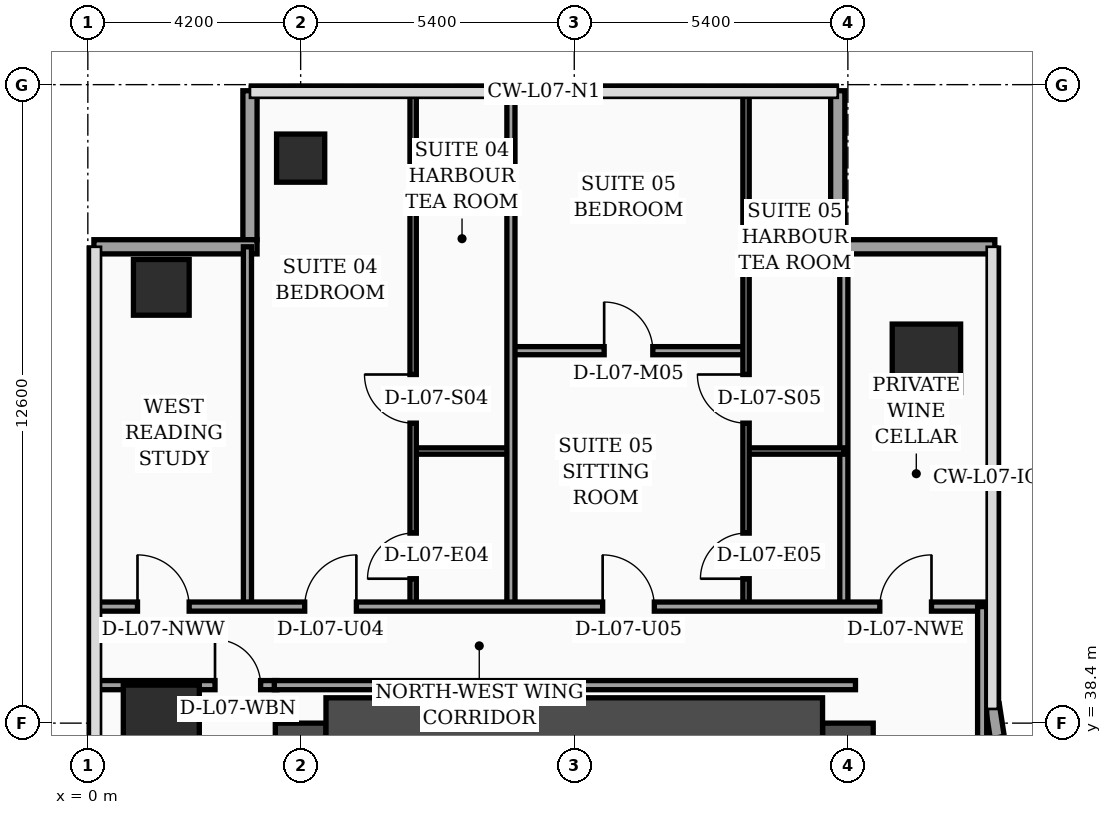
"""IFC4 building model, lengths in metres.
Left out: names, types, materials, properties, quantities, classifications, styles, units other than length and angle.
Written with IfcOpenShell. Run it as: python <this file> out.ifc"""

import sys

from ifc_helpers import new_model, si_unit, direction, frame, frame_2d, origin, origin_2d, place, context, subcontext, project, spatial, rectangle, hollow_rectangle, extrude, element, fill, save


model = new_model("IFC4")
c1 = context("Model", 3, precision=1e-05, world=origin(), true_north=direction((0.0, 1.0)))
c2 = subcontext(c1, "Body", "Model", "MODEL_VIEW")
j1 = project(units=[si_unit("LENGTHUNIT", "METRE"), si_unit("PLANEANGLEUNIT", "RADIAN")], contexts=[c1])
p1 = place(None, origin())
s1 = spatial("IfcSite", under=j1, at=p1, CompositionType="ELEMENT")
p2 = place(p1, origin())
s2 = spatial("IfcBuilding", under=s1, at=p2, CompositionType="ELEMENT")
p3 = place(p2, frame((0.0, 0.0, 34.6)))
s3 = spatial("IfcBuildingStorey", under=s2, at=p3, CompositionType="ELEMENT", Elevation=34.6)
p4 = place(p3, frame((4.2, 16.8, 0.0), z_axis=(0.0, 0.0, 1.0), x_axis=(0.0, 1.0, 0.0)))
e1 = element("IfcWall", 1, at=p4, inside=s3, PredefinedType="SHEAR", context=c2, shape_type="SweptSolid", body=[
    extrude(rectangle(XDim=21.6, YDim=1.0, at=frame_2d((10.8, 0.0))), origin(), (0.0, 0.0, 1.0), 3.56),
])
p5 = place(p3, frame((15.0, 16.8, 0.0), z_axis=(0.0, 0.0, 1.0), x_axis=(0.0, 1.0, 0.0)))
e2 = element("IfcWall", 2, at=p5, inside=s3, PredefinedType="SHEAR", context=c2, shape_type="SweptSolid", body=[
    extrude(rectangle(XDim=21.6, YDim=1.0, at=frame_2d((10.8, 0.0))), origin(), (0.0, 0.0, 1.0), 3.56),
])
p6 = place(p5, frame((8.65, 0.0, 0.0)))
e3 = element("IfcOpeningElement", 3, at=p6, cuts=e2, PredefinedType="OPENING", context=c2, shape_type="SweptSolid", body=[
    extrude(rectangle(XDim=1.1, YDim=2.2, at=frame_2d((0.55, 1.1))), frame((0.0, 0.51, 0.0), z_axis=(0.0, -1.0, 0.0), x_axis=(1.0, 0.0, 0.0)), (0.0, 0.0, 1.0), 1.02),
])
p7 = place(p5, frame((1.25, 0.0, 0.0)))
e4 = element("IfcOpeningElement", 4, at=p7, cuts=e2, PredefinedType="OPENING", context=c2, shape_type="SweptSolid", body=[
    extrude(rectangle(XDim=1.1, YDim=2.2, at=frame_2d((0.55, 1.1))), frame((0.0, 0.51, 0.0), z_axis=(0.0, -1.0, 0.0), x_axis=(1.0, 0.0, 0.0)), (0.0, 0.0, 1.0), 1.02),
])
p8 = place(p5, frame((3.8, 0.0, 0.0)))
e5 = element("IfcOpeningElement", 5, at=p8, cuts=e2, PredefinedType="OPENING", context=c2, shape_type="SweptSolid", body=[
    extrude(rectangle(XDim=1.1, YDim=2.2, at=frame_2d((0.55, 1.1))), frame((0.0, 0.51, 0.0), z_axis=(0.0, -1.0, 0.0), x_axis=(1.0, 0.0, 0.0)), (0.0, 0.0, 1.0), 1.02),
])
p9 = place(p5, frame((6.35, 0.0, 0.0)))
e6 = element("IfcOpeningElement", 6, at=p9, cuts=e2, PredefinedType="OPENING", context=c2, shape_type="SweptSolid", body=[
    extrude(rectangle(XDim=1.1, YDim=2.2, at=frame_2d((0.55, 1.1))), frame((0.0, 0.51, 0.0), z_axis=(0.0, -1.0, 0.0), x_axis=(1.0, 0.0, 0.0)), (0.0, 0.0, 1.0), 1.02),
])
p10 = place(p3, frame((4.7, 38.4, 0.0), z_axis=(0.0, 0.0, 1.0), x_axis=(1.0, 0.0, 0.0)))
e7 = element("IfcWall", 7, at=p10, inside=s3, PredefinedType="SHEAR", context=c2, shape_type="SweptSolid", body=[
    extrude(rectangle(XDim=9.8, YDim=1.0, at=frame_2d((4.9, 0.0))), origin(), (0.0, 0.0, 1.0), 3.56),
])
p11 = place(p3, frame((1.45, 38.4, 0.0), z_axis=(0.0, 0.0, 1.0), x_axis=(1.0, 0.0, 0.0)))
e8 = element("IfcColumn", 8, at=p11, inside=s3, PredefinedType="COLUMN", context=c2, shape_type="SweptSolid", body=[
    extrude(rectangle(XDim=1.5, YDim=1.5, at=origin_2d()), origin(), (0.0, 0.0, 1.0), 3.56),
])
p12 = place(p3, frame((1.45, 47.0, 0.0), z_axis=(0.0, 0.0, 1.0), x_axis=(1.0, 0.0, 0.0)))
e9 = element("IfcColumn", 9, at=p12, inside=s3, PredefinedType="COLUMN", context=c2, shape_type="SweptSolid", body=[
    extrude(hollow_rectangle(XDim=1.1, YDim=1.1, WallThickness=0.045, at=origin_2d()), origin(), (0.0, 0.0, 1.0), 3.56),
])
p13 = place(p3, frame((4.2, 49.55, 0.0), z_axis=(0.0, 0.0, 1.0), x_axis=(1.0, 0.0, 0.0)))
e10 = element("IfcColumn", 10, at=p13, inside=s3, PredefinedType="COLUMN", context=c2, shape_type="SweptSolid", body=[
    extrude(hollow_rectangle(XDim=0.95, YDim=0.95, WallThickness=0.04, at=origin_2d()), origin(), (0.0, 0.0, 1.0), 3.56),
])
p14 = place(p3, frame((16.55, 45.6, 0.0), z_axis=(0.0, 0.0, 1.0), x_axis=(1.0, 0.0, 0.0)))
e11 = element("IfcColumn", 11, at=p14, inside=s3, PredefinedType="COLUMN", context=c2, shape_type="SweptSolid", body=[
    extrude(rectangle(XDim=1.35, YDim=1.35, at=origin_2d()), origin(), (0.0, 0.0, 1.0), 3.56),
])
p15 = place(p3, frame((17.962, 38.03, 0.0), z_axis=(0.0, 0.0, 1.0), x_axis=(-0.15141125477, 0.988470855377, 0.0)))
e12 = element("IfcWall", 12, at=p15, inside=s3, PredefinedType="SOLIDWALL", context=c2, shape_type="SweptSolid", body=[
    extrude(rectangle(XDim=0.739, YDim=0.28, at=frame_2d((0.369, 0.0))), origin(), (0.0, 0.0, 1.0), 3.56),
])
p16 = place(p3, frame((17.9, 47.8, 0.0), z_axis=(0.0, 0.0, 1.0), x_axis=(-1.0, 0.0, 0.0)))
e13 = element("IfcWall", 13, at=p16, inside=s3, PredefinedType="SOLIDWALL", context=c2, shape_type="SweptSolid", body=[
    extrude(rectangle(XDim=3.24, YDim=0.28, at=frame_2d((1.62, 0.0))), origin(), (0.0, 0.0, 1.0), 3.56),
])
p17 = place(p3, frame((14.8, 47.94, 0.0), z_axis=(0.0, 0.0, 1.0), x_axis=(0.0, 1.0, 0.0)))
e14 = element("IfcWall", 14, at=p17, inside=s3, PredefinedType="SOLIDWALL", context=c2, shape_type="SweptSolid", body=[
    extrude(rectangle(XDim=2.94, YDim=0.28, at=frame_2d((1.47, 0.0))), origin(), (0.0, 0.0, 1.0), 3.56),
])
p18 = place(p3, frame((3.2, 50.88, 0.0), z_axis=(0.0, 0.0, 1.0), x_axis=(0.0, -1.0, 0.0)))
e15 = element("IfcWall", 15, at=p18, inside=s3, PredefinedType="SOLIDWALL", context=c2, shape_type="SweptSolid", body=[
    extrude(rectangle(XDim=2.94, YDim=0.28, at=frame_2d((1.47, 0.0))), origin(), (0.0, 0.0, 1.0), 3.04),
])
p19 = place(p3, frame((3.34, 47.8, 0.0), z_axis=(0.0, 0.0, 1.0), x_axis=(-1.0, 0.0, 0.0)))
e16 = element("IfcWall", 16, at=p19, inside=s3, PredefinedType="SOLIDWALL", context=c2, shape_type="SweptSolid", body=[
    extrude(rectangle(XDim=3.22, YDim=0.28, at=frame_2d((1.61, 0.0))), origin(), (0.0, 0.0, 1.0), 3.04),
])
p20 = place(p3, frame((0.08, 39.15, 0.0), z_axis=(0.0, 0.0, 1.0), x_axis=(1.0, 0.0, 0.0)))
e17 = element("IfcWall", 17, at=p20, inside=s3, PredefinedType="PARTITIONING", context=c2, shape_type="SweptSolid", body=[
    extrude(rectangle(XDim=3.65, YDim=0.18, at=frame_2d((1.825, 0.0))), origin(), (0.0, 0.0, 1.0), 2.84),
])
p21 = place(p20, frame((2.43, 0.0, 0.0)))
e18 = element("IfcOpeningElement", 18, at=p21, cuts=e17, PredefinedType="OPENING", context=c2, shape_type="SweptSolid", body=[
    extrude(rectangle(XDim=0.9, YDim=2.15, at=frame_2d((0.45, 1.075))), frame((0.0, 0.1, 0.0), z_axis=(0.0, -1.0, 0.0), x_axis=(1.0, 0.0, 0.0)), (0.0, 0.0, 1.0), 0.2),
])
p22 = place(p3, frame((3.15, 40.7, 0.0), z_axis=(0.0, 0.0, 1.0), x_axis=(0.0, 1.0, 0.0)))
e19 = element("IfcWall", 19, at=p22, inside=s3, PredefinedType="PARTITIONING", context=c2, shape_type="SweptSolid", body=[
    extrude(rectangle(XDim=7.1, YDim=0.16, at=frame_2d((3.55, 0.0))), origin(), (0.0, 0.0, 1.0), 3.14),
])
p23 = place(p3, frame((14.92, 40.7, 0.0), z_axis=(0.0, 0.0, 1.0), x_axis=(0.0, 1.0, 0.0)))
e20 = element("IfcWall", 20, at=p23, inside=s3, PredefinedType="PARTITIONING", context=c2, shape_type="SweptSolid", body=[
    extrude(rectangle(XDim=7.1, YDim=0.16, at=frame_2d((3.55, 0.0))), origin(), (0.0, 0.0, 1.0), 3.04),
])
p24 = place(p3, frame((6.42, 43.77, 0.0), z_axis=(0.0, 0.0, 1.0), x_axis=(1.0, 0.0, 0.0)))
e21 = element("IfcWall", 21, at=p24, inside=s3, PredefinedType="PARTITIONING", context=c2, shape_type="SweptSolid", body=[
    extrude(rectangle(XDim=1.93, YDim=0.125, at=frame_2d((0.965, 0.0))), origin(), (0.0, 0.0, 1.0), 3.56),
])
p25 = place(p3, frame((6.42, 40.7, 0.0), z_axis=(0.0, 0.0, 1.0), x_axis=(0.0, 1.0, 0.0)))
e22 = element("IfcWall", 22, at=p25, inside=s3, PredefinedType="PARTITIONING", context=c2, shape_type="SweptSolid", body=[
    extrude(rectangle(XDim=10.24, YDim=0.125, at=frame_2d((5.12, 0.0))), origin(), (0.0, 0.0, 1.0), 3.04),
])
p26 = place(p25, frame((0.55, 0.0, 0.0)))
e23 = element("IfcOpeningElement", 23, at=p26, cuts=e22, PredefinedType="OPENING", context=c2, shape_type="SweptSolid", body=[
    extrude(rectangle(XDim=0.9, YDim=2.15, at=frame_2d((0.45, 1.075))), frame((0.0, 0.073, 0.0), z_axis=(0.0, -1.0, 0.0), x_axis=(1.0, 0.0, 0.0)), (0.0, 0.0, 1.0), 0.145),
])
p27 = place(p25, frame((3.62, 0.0, 0.0)))
e24 = element("IfcOpeningElement", 24, at=p27, cuts=e22, PredefinedType="OPENING", context=c2, shape_type="SweptSolid", body=[
    extrude(rectangle(XDim=0.96, YDim=2.2, at=frame_2d((0.48, 1.1))), frame((0.0, 0.073, 0.0), z_axis=(0.0, -1.0, 0.0), x_axis=(1.0, 0.0, 0.0)), (0.0, 0.0, 1.0), 0.145),
])
p28 = place(p3, frame((12.99, 43.77, 0.0), z_axis=(0.0, 0.0, 1.0), x_axis=(1.0, 0.0, 0.0)))
e25 = element("IfcWall", 25, at=p28, inside=s3, PredefinedType="PARTITIONING", context=c2, shape_type="SweptSolid", body=[
    extrude(rectangle(XDim=1.93, YDim=0.125, at=frame_2d((0.965, 0.0))), origin(), (0.0, 0.0, 1.0), 3.56),
])
p29 = place(p3, frame((8.35, 45.75, 0.0), z_axis=(0.0, 0.0, 1.0), x_axis=(1.0, 0.0, 0.0)))
e26 = element("IfcWall", 26, at=p29, inside=s3, PredefinedType="PARTITIONING", context=c2, shape_type="SweptSolid", body=[
    extrude(rectangle(XDim=4.64, YDim=0.16, at=frame_2d((2.32, 0.0))), origin(), (0.0, 0.0, 1.0), 3.56),
])
p30 = place(p29, frame((1.84, 0.0, 0.0)))
e27 = element("IfcOpeningElement", 27, at=p30, cuts=e26, PredefinedType="OPENING", context=c2, shape_type="SweptSolid", body=[
    extrude(rectangle(XDim=0.96, YDim=2.2, at=frame_2d((0.48, 1.1))), frame((0.0, 0.09, 0.0), z_axis=(0.0, -1.0, 0.0), x_axis=(1.0, 0.0, 0.0)), (0.0, 0.0, 1.0), 0.18),
])
p31 = place(p3, frame((12.99, 40.7, 0.0), z_axis=(0.0, 0.0, 1.0), x_axis=(0.0, 1.0, 0.0)))
e28 = element("IfcWall", 28, at=p31, inside=s3, PredefinedType="PARTITIONING", context=c2, shape_type="SweptSolid", body=[
    extrude(rectangle(XDim=10.24, YDim=0.125, at=frame_2d((5.12, 0.0))), origin(), (0.0, 0.0, 1.0), 3.04),
])
p32 = place(p31, frame((0.55, 0.0, 0.0)))
e29 = element("IfcOpeningElement", 29, at=p32, cuts=e28, PredefinedType="OPENING", context=c2, shape_type="SweptSolid", body=[
    extrude(rectangle(XDim=0.9, YDim=2.15, at=frame_2d((0.45, 1.075))), frame((0.0, 0.073, 0.0), z_axis=(0.0, -1.0, 0.0), x_axis=(1.0, 0.0, 0.0)), (0.0, 0.0, 1.0), 0.145),
])
p33 = place(p31, frame((3.62, 0.0, 0.0)))
e30 = element("IfcOpeningElement", 30, at=p33, cuts=e28, PredefinedType="OPENING", context=c2, shape_type="SweptSolid", body=[
    extrude(rectangle(XDim=0.96, YDim=2.2, at=frame_2d((0.48, 1.1))), frame((0.0, 0.073, 0.0), z_axis=(0.0, -1.0, 0.0), x_axis=(1.0, 0.0, 0.0)), (0.0, 0.0, 1.0), 0.145),
])
p34 = place(p3, frame((8.35, 40.7, 0.0), z_axis=(0.0, 0.0, 1.0), x_axis=(0.0, 1.0, 0.0)))
e31 = element("IfcWall", 31, at=p34, inside=s3, PredefinedType="PARTITIONING", context=c2, shape_type="SweptSolid", body=[
    extrude(rectangle(XDim=10.24, YDim=0.16, at=frame_2d((5.12, 0.0))), origin(), (0.0, 0.0, 1.0), 3.04),
])
p35 = place(p3, frame((0.08, 40.7, 0.0), z_axis=(0.0, 0.0, 1.0), x_axis=(1.0, 0.0, 0.0)))
e32 = element("IfcWall", 32, at=p35, inside=s3, PredefinedType="PARTITIONING", context=c2, shape_type="SweptSolid", body=[
    extrude(rectangle(XDim=17.77, YDim=0.18, at=frame_2d((8.885, 0.0))), origin(), (0.0, 0.0, 1.0), 2.84),
])
p36 = place(p35, frame((0.9, 0.0, 0.0)))
e33 = element("IfcOpeningElement", 33, at=p36, cuts=e32, PredefinedType="OPENING", context=c2, shape_type="SweptSolid", body=[
    extrude(rectangle(XDim=1.02, YDim=2.2, at=frame_2d((0.51, 1.1))), frame((0.0, 0.1, 0.0), z_axis=(0.0, -1.0, 0.0), x_axis=(1.0, 0.0, 0.0)), (0.0, 0.0, 1.0), 0.2),
])
p37 = place(p35, frame((4.2, 0.0, 0.0)))
e34 = element("IfcOpeningElement", 34, at=p37, cuts=e32, PredefinedType="OPENING", context=c2, shape_type="SweptSolid", body=[
    extrude(rectangle(XDim=1.02, YDim=2.2, at=frame_2d((0.51, 1.1))), frame((0.0, 0.1, 0.0), z_axis=(0.0, -1.0, 0.0), x_axis=(1.0, 0.0, 0.0)), (0.0, 0.0, 1.0), 0.2),
])
p38 = place(p35, frame((10.08, 0.0, 0.0)))
e35 = element("IfcOpeningElement", 35, at=p38, cuts=e32, PredefinedType="OPENING", context=c2, shape_type="SweptSolid", body=[
    extrude(rectangle(XDim=1.02, YDim=2.2, at=frame_2d((0.51, 1.1))), frame((0.0, 0.1, 0.0), z_axis=(0.0, -1.0, 0.0), x_axis=(1.0, 0.0, 0.0)), (0.0, 0.0, 1.0), 0.2),
])
p39 = place(p35, frame((15.55, 0.0, 0.0)))
e36 = element("IfcOpeningElement", 36, at=p39, cuts=e32, PredefinedType="OPENING", context=c2, shape_type="SweptSolid", body=[
    extrude(rectangle(XDim=1.02, YDim=2.2, at=frame_2d((0.51, 1.1))), frame((0.0, 0.1, 0.0), z_axis=(0.0, -1.0, 0.0), x_axis=(1.0, 0.0, 0.0)), (0.0, 0.0, 1.0), 0.2),
])
p40 = place(p3, frame((17.65, 24.3, 0.0), z_axis=(0.0, 0.0, 1.0), x_axis=(0.0, 1.0, 0.0)))
e37 = element("IfcWall", 37, at=p40, inside=s3, PredefinedType="PARTITIONING", context=c2, shape_type="SweptSolid", body=[
    extrude(rectangle(XDim=16.4, YDim=0.18, at=frame_2d((8.2, 0.0))), origin(), (0.0, 0.0, 1.0), 2.84),
])
p41 = place(p3, frame((3.68, 39.15, 0.0), z_axis=(0.0, 0.0, 1.0), x_axis=(1.0, 0.0, 0.0)))
e38 = element("IfcWall", 38, at=p41, inside=s3, PredefinedType="PARTITIONING", context=c2, shape_type="SweptSolid", body=[
    extrude(rectangle(XDim=11.47, YDim=0.18, at=frame_2d((5.735, 0.0))), origin(), (0.0, 0.0, 1.0), 2.84),
])
p42 = place(p21, origin())
e39 = element("IfcDoor", 39, at=p42, inside=s3, OperationType="SINGLE_SWING_LEFT", PredefinedType="DOOR", context=c2, shape_type="SweptSolid", body=[
    extrude(rectangle(XDim=0.9, YDim=2.15, at=frame_2d((0.45, 1.075))), frame((0.0, 0.025, 0.0), z_axis=(0.0, -1.0, 0.0), x_axis=(1.0, 0.0, 0.0)), (0.0, 0.0, 1.0), 0.05),
])
fill(e18, e39)
p43 = place(p26, origin())
e40 = element("IfcDoor", 40, at=p43, inside=s3, OperationType="SINGLE_SWING_LEFT", PredefinedType="DOOR", context=c2, shape_type="SweptSolid", body=[
    extrude(rectangle(XDim=0.9, YDim=2.15, at=frame_2d((0.45, 1.075))), frame((0.0, 0.025, 0.0), z_axis=(0.0, -1.0, 0.0), x_axis=(1.0, 0.0, 0.0)), (0.0, 0.0, 1.0), 0.05),
])
fill(e23, e40)
p44 = place(p27, origin())
e41 = element("IfcDoor", 41, at=p44, inside=s3, OperationType="SINGLE_SWING_RIGHT", PredefinedType="DOOR", context=c2, shape_type="SweptSolid", body=[
    extrude(rectangle(XDim=0.96, YDim=2.2, at=frame_2d((0.48, 1.1))), frame((0.0, 0.025, 0.0), z_axis=(0.0, -1.0, 0.0), x_axis=(1.0, 0.0, 0.0)), (0.0, 0.0, 1.0), 0.05),
])
fill(e24, e41)
p45 = place(p30, origin())
e42 = element("IfcDoor", 42, at=p45, inside=s3, OperationType="SINGLE_SWING_LEFT", PredefinedType="DOOR", context=c2, shape_type="SweptSolid", body=[
    extrude(rectangle(XDim=0.96, YDim=2.2, at=frame_2d((0.48, 1.1))), frame((0.0, 0.025, 0.0), z_axis=(0.0, -1.0, 0.0), x_axis=(1.0, 0.0, 0.0)), (0.0, 0.0, 1.0), 0.05),
])
fill(e27, e42)
p46 = place(p32, origin())
e43 = element("IfcDoor", 43, at=p46, inside=s3, OperationType="SINGLE_SWING_LEFT", PredefinedType="DOOR", context=c2, shape_type="SweptSolid", body=[
    extrude(rectangle(XDim=0.9, YDim=2.15, at=frame_2d((0.45, 1.075))), frame((0.0, 0.025, 0.0), z_axis=(0.0, -1.0, 0.0), x_axis=(1.0, 0.0, 0.0)), (0.0, 0.0, 1.0), 0.05),
])
fill(e29, e43)
p47 = place(p33, origin())
e44 = element("IfcDoor", 44, at=p47, inside=s3, OperationType="SINGLE_SWING_RIGHT", PredefinedType="DOOR", context=c2, shape_type="SweptSolid", body=[
    extrude(rectangle(XDim=0.96, YDim=2.2, at=frame_2d((0.48, 1.1))), frame((0.0, 0.025, 0.0), z_axis=(0.0, -1.0, 0.0), x_axis=(1.0, 0.0, 0.0)), (0.0, 0.0, 1.0), 0.05),
])
fill(e30, e44)
p48 = place(p36, origin())
e45 = element("IfcDoor", 45, at=p48, inside=s3, OperationType="SINGLE_SWING_LEFT", PredefinedType="DOOR", context=c2, shape_type="SweptSolid", body=[
    extrude(rectangle(XDim=1.02, YDim=2.2, at=frame_2d((0.51, 1.1))), frame((0.0, 0.025, 0.0), z_axis=(0.0, -1.0, 0.0), x_axis=(1.0, 0.0, 0.0)), (0.0, 0.0, 1.0), 0.05),
])
fill(e33, e45)
p49 = place(p37, origin())
e46 = element("IfcDoor", 46, at=p49, inside=s3, OperationType="SINGLE_SWING_RIGHT", PredefinedType="DOOR", context=c2, shape_type="SweptSolid", body=[
    extrude(rectangle(XDim=1.02, YDim=2.2, at=frame_2d((0.51, 1.1))), frame((0.0, 0.025, 0.0), z_axis=(0.0, -1.0, 0.0), x_axis=(1.0, 0.0, 0.0)), (0.0, 0.0, 1.0), 0.05),
])
fill(e34, e46)
p50 = place(p38, origin())
e47 = element("IfcDoor", 47, at=p50, inside=s3, OperationType="SINGLE_SWING_LEFT", PredefinedType="DOOR", context=c2, shape_type="SweptSolid", body=[
    extrude(rectangle(XDim=1.02, YDim=2.2, at=frame_2d((0.51, 1.1))), frame((0.0, 0.025, 0.0), z_axis=(0.0, -1.0, 0.0), x_axis=(1.0, 0.0, 0.0)), (0.0, 0.0, 1.0), 0.05),
])
fill(e35, e47)
p51 = place(p39, origin())
e48 = element("IfcDoor", 48, at=p51, inside=s3, OperationType="SINGLE_SWING_RIGHT", PredefinedType="DOOR", context=c2, shape_type="SweptSolid", body=[
    extrude(rectangle(XDim=1.02, YDim=2.2, at=frame_2d((0.51, 1.1))), frame((0.0, 0.025, 0.0), z_axis=(0.0, -1.0, 0.0), x_axis=(1.0, 0.0, 0.0)), (0.0, 0.0, 1.0), 0.05),
])
fill(e36, e48)
save(model, sys.argv[1])
